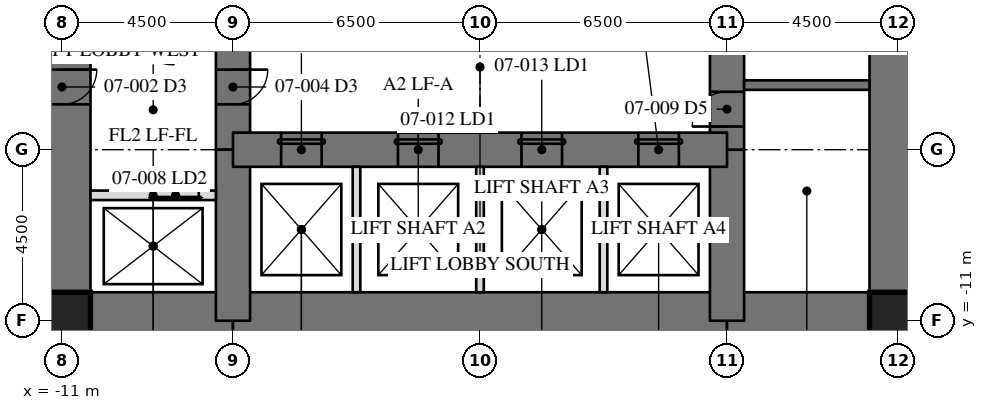
"""IFC4 building model, lengths in metres.
Left out: names, types, materials, properties, quantities, classifications, styles, units other than length and angle.
Written with IfcOpenShell. Run it as: python <this file> out.ifc"""

import sys

from ifc_helpers import new_model, si_unit, direction, frame, frame_2d, origin, origin_2d, place, context, subcontext, project, spatial, rectangle, hollow_rectangle, extrude, element, fill, save


model = new_model("IFC4")
c1 = context("Model", 3, precision=1e-05, world=origin(), true_north=direction((0.0, 1.0)))
c2 = subcontext(c1, "Body", "Model", "MODEL_VIEW")
j1 = project(units=[si_unit("LENGTHUNIT", "METRE"), si_unit("PLANEANGLEUNIT", "RADIAN")], contexts=[c1])
p1 = place(None, origin())
s1 = spatial("IfcSite", under=j1, at=p1, CompositionType="ELEMENT")
p2 = place(p1, origin())
s2 = spatial("IfcBuilding", under=s1, at=p2, CompositionType="ELEMENT")
p3 = place(p2, frame((0.0, 0.0, 32.4)))
s3 = spatial("IfcBuildingStorey", under=s2, at=p3, CompositionType="ELEMENT", Elevation=32.4)
p4 = place(p3, frame((11.0, -11.0, 0.0), z_axis=(0.0, 0.0, 1.0), x_axis=(0.0, 1.0, 0.0)))
e1 = element("IfcWall", 1, at=p4, inside=s3, PredefinedType="SHEAR", context=c2, shape_type="SweptSolid", body=[
    extrude(rectangle(XDim=22.0, YDim=1.5, at=frame_2d((11.0, 0.0))), origin(), (0.0, 0.0, 1.0), 4.1),
])
p5 = place(p4, frame((15.393, 0.0, 0.0)))
e2 = element("IfcOpeningElement", 2, at=p5, cuts=e1, PredefinedType="OPENING", context=c2, shape_type="SweptSolid", body=[
    extrude(rectangle(XDim=0.915, YDim=2.134, at=frame_2d((0.458, 1.067))), frame((0.0, 0.76, 0.0), z_axis=(0.0, -1.0, 0.0), x_axis=(1.0, 0.0, 0.0)), (0.0, 0.0, 1.0), 1.52),
])
p6 = place(p3, frame((-11.0, 11.0, 0.0), z_axis=(0.0, 0.0, 1.0), x_axis=(0.0, -1.0, 0.0)))
e3 = element("IfcWall", 3, at=p6, inside=s3, PredefinedType="SHEAR", context=c2, shape_type="SweptSolid", body=[
    extrude(rectangle(XDim=22.0, YDim=1.5, at=frame_2d((11.0, 0.0))), origin(), (0.0, 0.0, 1.0), 4.1),
])
p7 = place(p6, frame((15.393, 0.0, 0.0)))
e4 = element("IfcOpeningElement", 4, at=p7, cuts=e3, PredefinedType="OPENING", context=c2, shape_type="SweptSolid", body=[
    extrude(rectangle(XDim=0.915, YDim=2.134, at=frame_2d((0.458, 1.067))), frame((0.0, 0.76, 0.0), z_axis=(0.0, -1.0, 0.0), x_axis=(1.0, 0.0, 0.0)), (0.0, 0.0, 1.0), 1.52),
])
p8 = place(p3, frame((-11.0, -11.0, 0.0), z_axis=(0.0, 0.0, 1.0), x_axis=(1.0, 0.0, 0.0)))
e5 = element("IfcWall", 5, at=p8, inside=s3, PredefinedType="SHEAR", context=c2, shape_type="SweptSolid", body=[
    extrude(rectangle(XDim=4.5, YDim=1.5, at=frame_2d((2.25, 0.0))), origin(), (0.0, 0.0, 1.0), 4.1),
])
p9 = place(p3, frame((-6.5, -11.0, 0.0), z_axis=(0.0, 0.0, 1.0), x_axis=(1.0, 0.0, 0.0)))
e6 = element("IfcWall", 6, at=p9, inside=s3, PredefinedType="SHEAR", context=c2, shape_type="SweptSolid", body=[
    extrude(rectangle(XDim=13.0, YDim=1.5, at=frame_2d((6.5, 0.0))), origin(), (0.0, 0.0, 1.0), 4.1),
])
p10 = place(p3, frame((6.5, -11.0, 0.0), z_axis=(0.0, 0.0, 1.0), x_axis=(1.0, 0.0, 0.0)))
e7 = element("IfcWall", 7, at=p10, inside=s3, PredefinedType="SHEAR", context=c2, shape_type="SweptSolid", body=[
    extrude(rectangle(XDim=4.5, YDim=1.5, at=frame_2d((2.25, 0.0))), origin(), (0.0, 0.0, 1.0), 4.1),
])
p11 = place(p3, frame((6.5, -11.0, 0.0), z_axis=(0.0, 0.0, 1.0), x_axis=(0.0, 1.0, 0.0)))
e8 = element("IfcWall", 8, at=p11, inside=s3, PredefinedType="SHEAR", context=c2, shape_type="SweptSolid", body=[
    extrude(rectangle(XDim=4.5, YDim=0.9, at=frame_2d((2.25, 0.0))), origin(), (0.0, 0.0, 1.0), 4.1),
])
p12 = place(p3, frame((6.5, -6.5, 0.0), z_axis=(0.0, 0.0, 1.0), x_axis=(0.0, 1.0, 0.0)))
e9 = element("IfcWall", 9, at=p12, inside=s3, PredefinedType="SHEAR", context=c2, shape_type="SweptSolid", body=[
    extrude(rectangle(XDim=13.0, YDim=0.9, at=frame_2d((6.5, 0.0))), origin(), (0.0, 0.0, 1.0), 4.1),
])
p13 = place(p12, frame((10.893, 0.0, 0.0)))
e10 = element("IfcOpeningElement", 10, at=p13, cuts=e9, PredefinedType="OPENING", context=c2, shape_type="SweptSolid", body=[
    extrude(rectangle(XDim=0.915, YDim=2.134, at=frame_2d((0.458, 1.067))), frame((0.0, 0.46, 0.0), z_axis=(0.0, -1.0, 0.0), x_axis=(1.0, 0.0, 0.0)), (0.0, 0.0, 1.0), 0.92),
])
p14 = place(p12, frame((0.61, 0.0, 0.0)))
e11 = element("IfcOpeningElement", 11, at=p14, cuts=e9, PredefinedType="OPENING", context=c2, shape_type="SweptSolid", body=[
    extrude(rectangle(XDim=0.915, YDim=2.134, at=frame_2d((0.458, 1.067))), frame((0.0, 0.46, 0.0), z_axis=(0.0, -1.0, 0.0), x_axis=(1.0, 0.0, 0.0)), (0.0, 0.0, 1.0), 0.92),
])
p15 = place(p3, frame((-6.5, 6.5, 0.0), z_axis=(0.0, 0.0, 1.0), x_axis=(0.0, -1.0, 0.0)))
e12 = element("IfcWall", 12, at=p15, inside=s3, PredefinedType="SHEAR", context=c2, shape_type="SweptSolid", body=[
    extrude(rectangle(XDim=13.0, YDim=0.9, at=frame_2d((6.5, 0.0))), origin(), (0.0, 0.0, 1.0), 4.1),
])
p16 = place(p15, frame((10.893, 0.0, 0.0)))
e13 = element("IfcOpeningElement", 13, at=p16, cuts=e12, PredefinedType="OPENING", context=c2, shape_type="SweptSolid", body=[
    extrude(rectangle(XDim=0.915, YDim=2.134, at=frame_2d((0.458, 1.067))), frame((0.0, 0.46, 0.0), z_axis=(0.0, -1.0, 0.0), x_axis=(1.0, 0.0, 0.0)), (0.0, 0.0, 1.0), 0.92),
])
p17 = place(p15, frame((0.61, 0.0, 0.0)))
e14 = element("IfcOpeningElement", 14, at=p17, cuts=e12, PredefinedType="OPENING", context=c2, shape_type="SweptSolid", body=[
    extrude(rectangle(XDim=0.915, YDim=2.134, at=frame_2d((0.458, 1.067))), frame((0.0, 0.46, 0.0), z_axis=(0.0, -1.0, 0.0), x_axis=(1.0, 0.0, 0.0)), (0.0, 0.0, 1.0), 0.92),
])
p18 = place(p3, frame((-6.5, -6.5, 0.0), z_axis=(0.0, 0.0, 1.0), x_axis=(0.0, -1.0, 0.0)))
e15 = element("IfcWall", 15, at=p18, inside=s3, PredefinedType="SHEAR", context=c2, shape_type="SweptSolid", body=[
    extrude(rectangle(XDim=4.5, YDim=0.9, at=frame_2d((2.25, 0.0))), origin(), (0.0, 0.0, 1.0), 4.1),
])
p19 = place(p3, frame((-6.5, -6.5, 0.0), z_axis=(0.0, 0.0, 1.0), x_axis=(1.0, 0.0, 0.0)))
e16 = element("IfcWall", 16, at=p19, inside=s3, PredefinedType="SHEAR", context=c2, shape_type="SweptSolid", body=[
    extrude(rectangle(XDim=13.0, YDim=0.9, at=frame_2d((6.5, 0.0))), origin(), (0.0, 0.0, 1.0), 4.1),
])
p20 = place(p19, frame((1.267, 0.0, 0.0)))
e17 = element("IfcOpeningElement", 17, at=p20, cuts=e16, PredefinedType="OPENING", context=c2, shape_type="SweptSolid", body=[
    extrude(rectangle(XDim=1.067, YDim=2.134, at=frame_2d((0.533, 1.067))), frame((0.0, 0.46, 0.0), z_axis=(0.0, -1.0, 0.0), x_axis=(1.0, 0.0, 0.0)), (0.0, 0.0, 1.0), 0.92),
])
p21 = place(p19, frame((4.342, 0.0, 0.0)))
e18 = element("IfcOpeningElement", 18, at=p21, cuts=e16, PredefinedType="OPENING", context=c2, shape_type="SweptSolid", body=[
    extrude(rectangle(XDim=1.067, YDim=2.134, at=frame_2d((0.533, 1.067))), frame((0.0, 0.46, 0.0), z_axis=(0.0, -1.0, 0.0), x_axis=(1.0, 0.0, 0.0)), (0.0, 0.0, 1.0), 0.92),
])
p22 = place(p19, frame((7.592, 0.0, 0.0)))
e19 = element("IfcOpeningElement", 19, at=p22, cuts=e16, PredefinedType="OPENING", context=c2, shape_type="SweptSolid", body=[
    extrude(rectangle(XDim=1.067, YDim=2.134, at=frame_2d((0.533, 1.067))), frame((0.0, 0.46, 0.0), z_axis=(0.0, -1.0, 0.0), x_axis=(1.0, 0.0, 0.0)), (0.0, 0.0, 1.0), 0.92),
])
p23 = place(p19, frame((10.667, 0.0, 0.0)))
e20 = element("IfcOpeningElement", 20, at=p23, cuts=e16, PredefinedType="OPENING", context=c2, shape_type="SweptSolid", body=[
    extrude(rectangle(XDim=1.067, YDim=2.134, at=frame_2d((0.533, 1.067))), frame((0.0, 0.46, 0.0), z_axis=(0.0, -1.0, 0.0), x_axis=(1.0, 0.0, 0.0)), (0.0, 0.0, 1.0), 0.92),
])
for number, where, z_axis, x_axis in (
    (21, (-11.0, -11.0, 0.0), (0.0, 0.0, 1.0), (1.0, 0.0, 0.0)),
    (22, (11.0, -11.0, 0.0), (0.0, 0.0, 1.0), (1.0, 0.0, 0.0)),
):
    element("IfcColumn", number, at=place(p3, frame(where, z_axis=z_axis, x_axis=x_axis)), inside=s3, PredefinedType="COLUMN", context=c2, shape_type="SweptSolid", body=[
        extrude(hollow_rectangle(XDim=1.499, YDim=1.499, WallThickness=0.102, at=origin_2d()), origin(), (0.0, 0.0, 1.0), 4.1),
    ])
p24 = place(p3, frame((6.95, -4.8, 0.0), z_axis=(0.0, 0.0, 1.0), x_axis=(1.0, 0.0, 0.0)))
e23 = element("IfcWall", 23, at=p24, inside=s3, PredefinedType="SOLIDWALL", context=c2, shape_type="SweptSolid", body=[
    extrude(rectangle(XDim=3.3, YDim=0.25, at=frame_2d((1.65, 0.0))), origin(), (0.0, 0.0, 1.0), 3.91),
])
p25 = place(p3, frame((-6.95, -7.7, 0.0), z_axis=(0.0, 0.0, 1.0), x_axis=(-1.0, 0.0, 0.0)))
e24 = element("IfcWall", 24, at=p25, inside=s3, PredefinedType="PARTITIONING", context=c2, shape_type="SweptSolid", body=[
    extrude(rectangle(XDim=3.3, YDim=0.25, at=frame_2d((1.65, 0.0))), origin(), (0.0, 0.0, 1.0), 3.91),
])
p26 = place(p25, frame((0.45, 0.0, 0.0)))
e25 = element("IfcOpeningElement", 25, at=p26, cuts=e24, PredefinedType="OPENING", context=c2, shape_type="SweptSolid", body=[
    extrude(rectangle(XDim=1.219, YDim=2.134, at=frame_2d((0.609, 1.067))), frame((0.0, 0.135, 0.0), z_axis=(0.0, -1.0, 0.0), x_axis=(1.0, 0.0, 0.0)), (0.0, 0.0, 1.0), 0.27),
])
for number, where, z_axis, x_axis in (
    (26, (-3.25, -10.25, 0.0), (0.0, 0.0, 1.0), (0.0, 1.0, 0.0)),
    (27, (0.0, -10.25, 0.0), (0.0, 0.0, 1.0), (0.0, 1.0, 0.0)),
    (28, (3.25, -10.25, 0.0), (0.0, 0.0, 1.0), (0.0, 1.0, 0.0)),
):
    element("IfcWall", number, at=place(p3, frame(where, z_axis=z_axis, x_axis=x_axis)), inside=s3, PredefinedType="PARTITIONING", context=c2, shape_type="SweptSolid", body=[
        extrude(rectangle(XDim=3.3, YDim=0.2, at=frame_2d((1.65, 0.0))), origin(), (0.0, 0.0, 1.0), 3.91),
    ])
p27 = place(p16, origin())
e29 = element("IfcDoor", 29, at=p27, inside=s3, OperationType="SINGLE_SWING_RIGHT", PredefinedType="DOOR", context=c2, shape_type="SweptSolid", body=[
    extrude(rectangle(XDim=0.915, YDim=2.134, at=frame_2d((0.458, 1.067))), frame((0.0, -0.375, 0.0), z_axis=(0.0, -1.0, 0.0), x_axis=(1.0, 0.0, 0.0)), (0.0, 0.0, 1.0), 0.05),
])
fill(e13, e29)
p28 = place(p26, origin())
e30 = element("IfcDoor", 30, at=p28, inside=s3, OperationType="SLIDING_TO_LEFT", PredefinedType="DOOR", context=c2, shape_type="SweptSolid", body=[
    extrude(rectangle(XDim=1.219, YDim=2.134, at=frame_2d((0.609, 1.067))), frame((0.0, 0.025, 0.0), z_axis=(0.0, -1.0, 0.0), x_axis=(1.0, 0.0, 0.0)), (0.0, 0.0, 1.0), 0.05),
])
fill(e25, e30)
p29 = place(p14, origin())
e31 = element("IfcDoor", 31, at=p29, inside=s3, OperationType="SINGLE_SWING_RIGHT", PredefinedType="DOOR", context=c2, shape_type="SweptSolid", body=[
    extrude(rectangle(XDim=0.915, YDim=2.134, at=frame_2d((0.458, 1.067))), frame((0.0, -0.375, 0.0), z_axis=(0.0, -1.0, 0.0), x_axis=(1.0, 0.0, 0.0)), (0.0, 0.0, 1.0), 0.05),
])
fill(e11, e31)
p30 = place(p20, origin())
e32 = element("IfcDoor", 32, at=p30, inside=s3, OperationType="SLIDING_TO_LEFT", PredefinedType="DOOR", context=c2, shape_type="SweptSolid", body=[
    extrude(rectangle(XDim=1.067, YDim=2.134, at=frame_2d((0.533, 1.067))), frame((0.0, -0.375, 0.0), z_axis=(0.0, -1.0, 0.0), x_axis=(1.0, 0.0, 0.0)), (0.0, 0.0, 1.0), 0.05),
])
fill(e17, e32)
p31 = place(p21, origin())
e33 = element("IfcDoor", 33, at=p31, inside=s3, OperationType="SLIDING_TO_LEFT", PredefinedType="DOOR", context=c2, shape_type="SweptSolid", body=[
    extrude(rectangle(XDim=1.067, YDim=2.134, at=frame_2d((0.533, 1.067))), frame((0.0, -0.375, 0.0), z_axis=(0.0, -1.0, 0.0), x_axis=(1.0, 0.0, 0.0)), (0.0, 0.0, 1.0), 0.05),
])
fill(e18, e33)
p32 = place(p22, origin())
e34 = element("IfcDoor", 34, at=p32, inside=s3, OperationType="SLIDING_TO_LEFT", PredefinedType="DOOR", context=c2, shape_type="SweptSolid", body=[
    extrude(rectangle(XDim=1.067, YDim=2.134, at=frame_2d((0.533, 1.067))), frame((0.0, -0.375, 0.0), z_axis=(0.0, -1.0, 0.0), x_axis=(1.0, 0.0, 0.0)), (0.0, 0.0, 1.0), 0.05),
])
fill(e19, e34)
p33 = place(p23, origin())
e35 = element("IfcDoor", 35, at=p33, inside=s3, OperationType="SLIDING_TO_LEFT", PredefinedType="DOOR", context=c2, shape_type="SweptSolid", body=[
    extrude(rectangle(XDim=1.067, YDim=2.134, at=frame_2d((0.533, 1.067))), frame((0.0, -0.375, 0.0), z_axis=(0.0, -1.0, 0.0), x_axis=(1.0, 0.0, 0.0)), (0.0, 0.0, 1.0), 0.05),
])
fill(e20, e35)
save(model, sys.argv[1])
